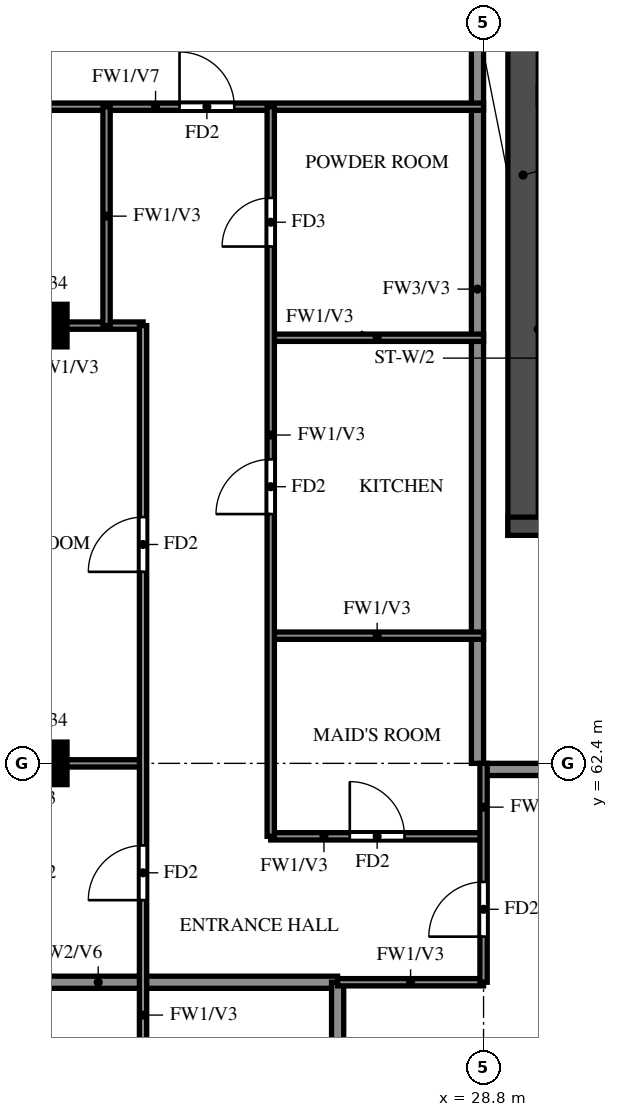
"""IFC4 building model, lengths in metres.
Left out: names, types, materials, properties, quantities, classifications, styles, units other than length and angle.
Written with IfcOpenShell. Run it as: python <this file> out.ifc"""

import sys

from ifc_helpers import new_model, si_unit, direction, frame, frame_2d, origin, origin_2d, place, context, subcontext, project, spatial, rectangle, extrude, source, transform, mapped, element, fill, save


model = new_model("IFC4")
c1 = context("Model", 3, precision=1e-05, world=origin(), true_north=direction((0.0, 1.0)))
c2 = subcontext(c1, "Body", "Model", "MODEL_VIEW")
j1 = project(units=[si_unit("LENGTHUNIT", "METRE"), si_unit("PLANEANGLEUNIT", "RADIAN")], contexts=[c1])
p1 = place(None, origin())
s1 = spatial("IfcSite", under=j1, at=p1, CompositionType="ELEMENT")
p2 = place(p1, origin())
s2 = spatial("IfcBuilding", under=s1, at=p2, CompositionType="ELEMENT")
p3 = place(p2, frame((0.0, 0.0, 260.5)))
s3 = spatial("IfcBuildingStorey", under=s2, at=p3, CompositionType="ELEMENT", Elevation=260.5)
m1 = source(origin(), c2, "Body", "SweptSolid", [
    extrude(rectangle(XDim=0.7, YDim=0.7, at=origin_2d()), origin(), (0.0, 0.0, 1.0), 3.22),
])
for number, where, z_axis, x_axis in (
    (1, (21.6, 62.4, 0.0), (0.0, 0.0, 1.0), (1.0, 0.0, 0.0)),
    (2, (21.6, 69.6, 0.0), (0.0, 0.0, 1.0), (1.0, 0.0, 0.0)),
):
    element("IfcColumn", number, at=place(p3, frame(where, z_axis=z_axis, x_axis=x_axis)), inside=s3, PredefinedType="COLUMN", context=c2, shape_type="MappedRepresentation", body=[
        mapped(m1, transform((0.0, 0.0, 0.0))),
    ])
p4 = place(p3, frame((29.45, 66.15, 0.0), z_axis=(0.0, 0.0, 1.0), x_axis=(0.0, 1.0, 0.0)))
e3 = element("IfcWall", 3, at=p4, inside=s3, PredefinedType="SHEAR", context=c2, shape_type="SweptSolid", body=[
    extrude(rectangle(XDim=11.85, YDim=0.5, at=frame_2d((5.925, 0.0))), origin(), (0.0, 0.0, 1.0), 3.22),
])
p5 = place(p3, frame((29.2, 66.3, 0.0), z_axis=(0.0, 0.0, 1.0), x_axis=(1.0, 0.0, 0.0)))
e4 = element("IfcWall", 4, at=p5, inside=s3, PredefinedType="SHEAR", context=c2, shape_type="SweptSolid", body=[
    extrude(rectangle(XDim=42.4, YDim=0.3, at=frame_2d((21.2, 0.0))), origin(), (0.0, 0.0, 1.0), 3.22),
])
p6 = place(p5, frame((1.425, 0.0, 0.0)))
e5 = element("IfcOpeningElement", 5, at=p6, cuts=e4, PredefinedType="OPENING", context=c2, shape_type="SweptSolid", body=[
    extrude(rectangle(XDim=1.1, YDim=2.1, at=frame_2d((0.55, 1.05))), frame((0.0, 0.16, 0.0), z_axis=(0.0, -1.0, 0.0), x_axis=(1.0, 0.0, 0.0)), (0.0, 0.0, 1.0), 0.32),
])
p7 = place(p5, frame((4.2, 0.0, 0.0)))
e6 = element("IfcOpeningElement", 6, at=p7, cuts=e4, PredefinedType="OPENING", context=c2, shape_type="SweptSolid", body=[
    extrude(rectangle(XDim=1.8, YDim=2.1, at=frame_2d((0.9, 1.05))), frame((0.0, 0.16, 0.0), z_axis=(0.0, -1.0, 0.0), x_axis=(1.0, 0.0, 0.0)), (0.0, 0.0, 1.0), 0.32),
])
p8 = place(p3, frame((28.8, 62.3, 0.0), z_axis=(0.0, 0.0, 1.0), x_axis=(1.0, 0.0, 0.0)))
e7 = element("IfcWall", 7, at=p8, inside=s3, PredefinedType="SOLIDWALL", context=c2, shape_type="SweptSolid", body=[
    extrude(rectangle(XDim=4.8, YDim=0.2, at=frame_2d((2.4, 0.0))), origin(), (0.0, 0.0, 1.0), 3.22),
])
p9 = place(p3, frame((28.7, 62.4, 0.0), z_axis=(0.0, 0.0, 1.0), x_axis=(0.0, 1.0, 0.0)))
e8 = element("IfcWall", 8, at=p9, inside=s3, PredefinedType="SOLIDWALL", context=c2, shape_type="SweptSolid", body=[
    extrude(rectangle(XDim=15.6, YDim=0.2, at=frame_2d((7.8, 0.0))), origin(), (0.0, 0.0, 1.0), 3.22),
])
p10 = place(p3, frame((18.525, 58.8, 0.0), z_axis=(0.0, 0.0, 1.0), x_axis=(1.0, 0.0, 0.0)))
e9 = element("IfcWall", 9, at=p10, inside=s3, PredefinedType="SOLIDWALL", context=c2, shape_type="SweptSolid", body=[
    extrude(rectangle(XDim=7.875, YDim=0.2, at=frame_2d((3.938, 0.0))), origin(), (0.0, 0.0, 1.0), 2.32),
])
p11 = place(p3, frame((26.4, 56.4, 0.0), z_axis=(0.0, 0.0, 1.0), x_axis=(0.0, 1.0, 0.0)))
e10 = element("IfcWall", 10, at=p11, inside=s3, PredefinedType="SOLIDWALL", context=c2, shape_type="SweptSolid", body=[
    extrude(rectangle(XDim=2.4, YDim=0.2, at=frame_2d((1.2, 0.0))), origin(), (0.0, 0.0, 1.0), 3.22),
])
p12 = place(p3, frame((26.4, 58.8, 0.0), z_axis=(0.0, 0.0, 1.0), x_axis=(1.0, 0.0, 0.0)))
e11 = element("IfcWall", 11, at=p12, inside=s3, PredefinedType="PARTITIONING", context=c2, shape_type="SweptSolid", body=[
    extrude(rectangle(XDim=2.4, YDim=0.12, at=frame_2d((1.2, 0.0))), origin(), (0.0, 0.0, 1.0), 3.22),
])
p13 = place(p3, frame((25.3, 61.2, 0.0), z_axis=(0.0, 0.0, 1.0), x_axis=(1.0, 0.0, 0.0)))
e12 = element("IfcWall", 12, at=p13, inside=s3, PredefinedType="PARTITIONING", context=c2, shape_type="SweptSolid", body=[
    extrude(rectangle(XDim=3.5, YDim=0.12, at=frame_2d((1.75, 0.0))), origin(), (0.0, 0.0, 1.0), 3.22),
])
p14 = place(p13, frame((1.3, 0.0, 0.0)))
e13 = element("IfcOpeningElement", 13, at=p14, cuts=e12, PredefinedType="OPENING", context=c2, shape_type="SweptSolid", body=[
    extrude(rectangle(XDim=0.9, YDim=2.1, at=frame_2d((0.45, 1.05))), frame((0.0, 0.07, 0.0), z_axis=(0.0, -1.0, 0.0), x_axis=(1.0, 0.0, 0.0)), (0.0, 0.0, 1.0), 0.14),
])
p15 = place(p3, frame((18.525, 62.4, 0.0), z_axis=(0.0, 0.0, 1.0), x_axis=(1.0, 0.0, 0.0)))
e14 = element("IfcWall", 14, at=p15, inside=s3, PredefinedType="PARTITIONING", context=c2, shape_type="SweptSolid", body=[
    extrude(rectangle(XDim=4.675, YDim=0.12, at=frame_2d((2.337, 0.0))), origin(), (0.0, 0.0, 1.0), 3.22),
])
for number, where, z_axis, x_axis in (
    (15, (25.3, 64.5, 0.0), (0.0, 0.0, 1.0), (1.0, 0.0, 0.0)),
    (16, (25.3, 69.4, 0.0), (0.0, 0.0, 1.0), (1.0, 0.0, 0.0)),
):
    element("IfcWall", number, at=place(p3, frame(where, z_axis=z_axis, x_axis=x_axis)), inside=s3, PredefinedType="PARTITIONING", context=c2, shape_type="SweptSolid", body=[
        extrude(rectangle(XDim=3.5, YDim=0.12, at=frame_2d((1.75, 0.0))), origin(), (0.0, 0.0, 1.0), 3.22),
    ])
p16 = place(p3, frame((18.525, 69.6, 0.0), z_axis=(0.0, 0.0, 1.0), x_axis=(1.0, 0.0, 0.0)))
e17 = element("IfcWall", 17, at=p16, inside=s3, PredefinedType="PARTITIONING", context=c2, shape_type="SweptSolid", body=[
    extrude(rectangle(XDim=4.675, YDim=0.12, at=frame_2d((2.337, 0.0))), origin(), (0.0, 0.0, 1.0), 3.22),
])
p17 = place(p16, frame((1.538, 0.0, 0.0)))
e18 = element("IfcOpeningElement", 18, at=p17, cuts=e17, PredefinedType="OPENING", context=c2, shape_type="SweptSolid", body=[
    extrude(rectangle(XDim=0.8, YDim=2.1, at=frame_2d((0.4, 1.05))), frame((0.0, 0.07, 0.0), z_axis=(0.0, -1.0, 0.0), x_axis=(1.0, 0.0, 0.0)), (0.0, 0.0, 1.0), 0.14),
])
p18 = place(p3, frame((18.525, 73.2, 0.0), z_axis=(0.0, 0.0, 1.0), x_axis=(1.0, 0.0, 0.0)))
e19 = element("IfcWall", 19, at=p18, inside=s3, PredefinedType="PARTITIONING", context=c2, shape_type="SweptSolid", body=[
    extrude(rectangle(XDim=10.275, YDim=0.12, at=frame_2d((5.138, 0.0))), origin(), (0.0, 0.0, 1.0), 2.32),
])
p19 = place(p18, frame((5.275, 0.0, 0.0)))
e20 = element("IfcOpeningElement", 20, at=p19, cuts=e19, PredefinedType="OPENING", context=c2, shape_type="SweptSolid", body=[
    extrude(rectangle(XDim=0.9, YDim=2.1, at=frame_2d((0.45, 1.05))), frame((0.0, 0.07, 0.0), z_axis=(0.0, -1.0, 0.0), x_axis=(1.0, 0.0, 0.0)), (0.0, 0.0, 1.0), 0.14),
])
p20 = place(p3, frame((22.6, 69.6, 0.0), z_axis=(0.0, 0.0, 1.0), x_axis=(0.0, 1.0, 0.0)))
e21 = element("IfcWall", 21, at=p20, inside=s3, PredefinedType="PARTITIONING", context=c2, shape_type="SweptSolid", body=[
    extrude(rectangle(XDim=3.6, YDim=0.12, at=frame_2d((1.8, 0.0))), origin(), (0.0, 0.0, 1.0), 3.22),
])
p21 = place(p3, frame((23.2, 48.0, 0.0), z_axis=(0.0, 0.0, 1.0), x_axis=(0.0, 1.0, 0.0)))
e22 = element("IfcWall", 22, at=p21, inside=s3, PredefinedType="PARTITIONING", context=c2, shape_type="SweptSolid", body=[
    extrude(rectangle(XDim=21.6, YDim=0.12, at=frame_2d((10.8, 0.0))), origin(), (0.0, 0.0, 1.0), 3.22),
])
p22 = place(p21, frame((1.35, 0.0, 0.0)))
e23 = element("IfcOpeningElement", 23, at=p22, cuts=e22, PredefinedType="OPENING", context=c2, shape_type="SweptSolid", body=[
    extrude(rectangle(XDim=0.9, YDim=2.1, at=frame_2d((0.45, 1.05))), frame((0.0, 0.07, 0.0), z_axis=(0.0, -1.0, 0.0), x_axis=(1.0, 0.0, 0.0)), (0.0, 0.0, 1.0), 0.14),
])
p23 = place(p21, frame((7.95, 0.0, 0.0)))
e24 = element("IfcOpeningElement", 24, at=p23, cuts=e22, PredefinedType="OPENING", context=c2, shape_type="SweptSolid", body=[
    extrude(rectangle(XDim=1.5, YDim=2.1, at=frame_2d((0.75, 1.05))), frame((0.0, 0.07, 0.0), z_axis=(0.0, -1.0, 0.0), x_axis=(1.0, 0.0, 0.0)), (0.0, 0.0, 1.0), 0.14),
])
p24 = place(p21, frame((12.15, 0.0, 0.0)))
e25 = element("IfcOpeningElement", 25, at=p24, cuts=e22, PredefinedType="OPENING", context=c2, shape_type="SweptSolid", body=[
    extrude(rectangle(XDim=0.9, YDim=2.1, at=frame_2d((0.45, 1.05))), frame((0.0, 0.07, 0.0), z_axis=(0.0, -1.0, 0.0), x_axis=(1.0, 0.0, 0.0)), (0.0, 0.0, 1.0), 0.14),
])
p25 = place(p21, frame((17.55, 0.0, 0.0)))
e26 = element("IfcOpeningElement", 26, at=p25, cuts=e22, PredefinedType="OPENING", context=c2, shape_type="SweptSolid", body=[
    extrude(rectangle(XDim=0.9, YDim=2.1, at=frame_2d((0.45, 1.05))), frame((0.0, 0.07, 0.0), z_axis=(0.0, -1.0, 0.0), x_axis=(1.0, 0.0, 0.0)), (0.0, 0.0, 1.0), 0.14),
])
p26 = place(p3, frame((25.3, 61.2, 0.0), z_axis=(0.0, 0.0, 1.0), x_axis=(0.0, 1.0, 0.0)))
e27 = element("IfcWall", 27, at=p26, inside=s3, PredefinedType="PARTITIONING", context=c2, shape_type="SweptSolid", body=[
    extrude(rectangle(XDim=12.0, YDim=0.12, at=frame_2d((6.0, 0.0))), origin(), (0.0, 0.0, 1.0), 3.22),
])
p27 = place(p26, frame((5.3, 0.0, 0.0)))
e28 = element("IfcOpeningElement", 28, at=p27, cuts=e27, PredefinedType="OPENING", context=c2, shape_type="SweptSolid", body=[
    extrude(rectangle(XDim=0.9, YDim=2.1, at=frame_2d((0.45, 1.05))), frame((0.0, 0.07, 0.0), z_axis=(0.0, -1.0, 0.0), x_axis=(1.0, 0.0, 0.0)), (0.0, 0.0, 1.0), 0.14),
])
p28 = place(p26, frame((9.7, 0.0, 0.0)))
e29 = element("IfcOpeningElement", 29, at=p28, cuts=e27, PredefinedType="OPENING", context=c2, shape_type="SweptSolid", body=[
    extrude(rectangle(XDim=0.8, YDim=2.1, at=frame_2d((0.4, 1.05))), frame((0.0, 0.07, 0.0), z_axis=(0.0, -1.0, 0.0), x_axis=(1.0, 0.0, 0.0)), (0.0, 0.0, 1.0), 0.14),
])
p29 = place(p3, frame((28.8, 58.8, 0.0), z_axis=(0.0, 0.0, 1.0), x_axis=(0.0, 1.0, 0.0)))
e30 = element("IfcWall", 30, at=p29, inside=s3, PredefinedType="PARTITIONING", context=c2, shape_type="SweptSolid", body=[
    extrude(rectangle(XDim=3.6, YDim=0.12, at=frame_2d((1.8, 0.0))), origin(), (0.0, 0.0, 1.0), 3.22),
])
p30 = place(p29, frame((0.75, 0.0, 0.0)))
e31 = element("IfcOpeningElement", 31, at=p30, cuts=e30, PredefinedType="OPENING", context=c2, shape_type="SweptSolid", body=[
    extrude(rectangle(XDim=0.9, YDim=2.1, at=frame_2d((0.45, 1.05))), frame((0.0, 0.07, 0.0), z_axis=(0.0, -1.0, 0.0), x_axis=(1.0, 0.0, 0.0)), (0.0, 0.0, 1.0), 0.14),
])
p31 = place(p30, origin())
e32 = element("IfcDoor", 32, at=p31, inside=s3, OperationType="SINGLE_SWING_LEFT", PredefinedType="DOOR", context=c2, shape_type="SweptSolid", body=[
    extrude(rectangle(XDim=0.9, YDim=2.1, at=frame_2d((0.45, 1.05))), frame((0.0, 0.025, 0.0), z_axis=(0.0, -1.0, 0.0), x_axis=(1.0, 0.0, 0.0)), (0.0, 0.0, 1.0), 0.05),
])
fill(e31, e32)
p32 = place(p24, origin())
e33 = element("IfcDoor", 33, at=p32, inside=s3, OperationType="SINGLE_SWING_LEFT", PredefinedType="DOOR", context=c2, shape_type="SweptSolid", body=[
    extrude(rectangle(XDim=0.9, YDim=2.1, at=frame_2d((0.45, 1.05))), frame((0.0, 0.025, 0.0), z_axis=(0.0, -1.0, 0.0), x_axis=(1.0, 0.0, 0.0)), (0.0, 0.0, 1.0), 0.05),
])
fill(e25, e33)
p33 = place(p25, origin())
e34 = element("IfcDoor", 34, at=p33, inside=s3, OperationType="SINGLE_SWING_LEFT", PredefinedType="DOOR", context=c2, shape_type="SweptSolid", body=[
    extrude(rectangle(XDim=0.9, YDim=2.1, at=frame_2d((0.45, 1.05))), frame((0.0, 0.025, 0.0), z_axis=(0.0, -1.0, 0.0), x_axis=(1.0, 0.0, 0.0)), (0.0, 0.0, 1.0), 0.05),
])
fill(e26, e34)
p34 = place(p19, origin())
e35 = element("IfcDoor", 35, at=p34, inside=s3, OperationType="SINGLE_SWING_LEFT", PredefinedType="DOOR", context=c2, shape_type="SweptSolid", body=[
    extrude(rectangle(XDim=0.9, YDim=2.1, at=frame_2d((0.45, 1.05))), frame((0.0, 0.025, 0.0), z_axis=(0.0, -1.0, 0.0), x_axis=(1.0, 0.0, 0.0)), (0.0, 0.0, 1.0), 0.05),
])
fill(e20, e35)
p35 = place(p14, origin())
e36 = element("IfcDoor", 36, at=p35, inside=s3, OperationType="SINGLE_SWING_LEFT", PredefinedType="DOOR", context=c2, shape_type="SweptSolid", body=[
    extrude(rectangle(XDim=0.9, YDim=2.1, at=frame_2d((0.45, 1.05))), frame((0.0, 0.025, 0.0), z_axis=(0.0, -1.0, 0.0), x_axis=(1.0, 0.0, 0.0)), (0.0, 0.0, 1.0), 0.05),
])
fill(e13, e36)
p36 = place(p27, origin())
e37 = element("IfcDoor", 37, at=p36, inside=s3, OperationType="SINGLE_SWING_RIGHT", PredefinedType="DOOR", context=c2, shape_type="SweptSolid", body=[
    extrude(rectangle(XDim=0.9, YDim=2.1, at=frame_2d((0.45, 1.05))), frame((0.0, 0.025, 0.0), z_axis=(0.0, -1.0, 0.0), x_axis=(1.0, 0.0, 0.0)), (0.0, 0.0, 1.0), 0.05),
])
fill(e28, e37)
p37 = place(p28, origin())
e38 = element("IfcDoor", 38, at=p37, inside=s3, OperationType="SINGLE_SWING_LEFT", PredefinedType="DOOR", context=c2, shape_type="SweptSolid", body=[
    extrude(rectangle(XDim=0.8, YDim=2.1, at=frame_2d((0.4, 1.05))), frame((0.0, 0.025, 0.0), z_axis=(0.0, -1.0, 0.0), x_axis=(1.0, 0.0, 0.0)), (0.0, 0.0, 1.0), 0.05),
])
fill(e29, e38)
save(model, sys.argv[1])
